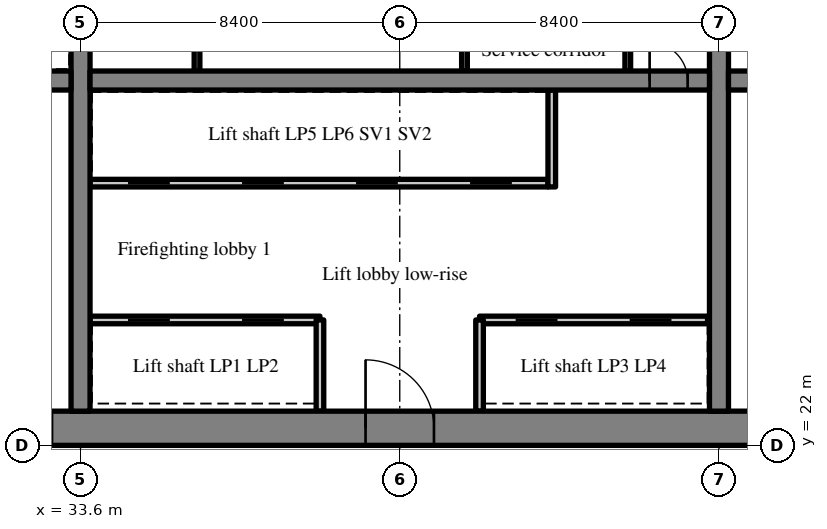
"""IFC4 building model, lengths in metres.
Left out: names, types, materials, properties, quantities, classifications, styles, units other than length and angle.
Written with IfcOpenShell. Run it as: python <this file> out.ifc"""

import sys

from ifc_helpers import new_model, si_unit, direction, frame, frame_2d, origin, place, context, subcontext, project, spatial, rectangle, extrude, source, transform, mapped, element, fill, save


model = new_model("IFC4")
c1 = context("Model", 3, precision=1e-05, world=origin(), true_north=direction((0.0, 1.0)))
c2 = subcontext(c1, "Body", "Model", "MODEL_VIEW")
j1 = project(units=[si_unit("LENGTHUNIT", "METRE"), si_unit("PLANEANGLEUNIT", "RADIAN")], contexts=[c1])
p1 = place(None, origin())
s1 = spatial("IfcSite", under=j1, at=p1, CompositionType="ELEMENT")
p2 = place(p1, origin())
s2 = spatial("IfcBuilding", under=s1, at=p2, CompositionType="ELEMENT")
p3 = place(p2, frame((0.0, 0.0, 114.2)))
s3 = spatial("IfcBuildingStorey", under=s2, at=p3, CompositionType="ELEMENT", Elevation=114.2)
m1 = source(origin(), c2, "Body", "SweptSolid", [
    extrude(rectangle(XDim=50.4, YDim=0.9, at=frame_2d((25.2, 0.0))), origin(), (0.0, 0.0, 1.0), 3.52),
])
p4 = place(p3, frame((25.2, 22.45, 0.0), z_axis=(0.0, 0.0, 1.0), x_axis=(1.0, 0.0, 0.0)))
e1 = element("IfcWall", 1, at=p4, inside=s3, PredefinedType="SHEAR", context=c2, shape_type="MappedRepresentation", body=[
    mapped(m1, transform((0.0, 0.0, 0.0), scale=1.0)),
])
m2 = source(origin(), c2, "Body", "SweptSolid", [
    extrude(rectangle(XDim=1.8, YDim=2.1, at=frame_2d((0.9, 1.05))), frame((0.0, 0.46, 0.0), z_axis=(0.0, -1.0, 0.0), x_axis=(1.0, 0.0, 0.0)), (0.0, 0.0, 1.0), 0.92),
])
p5 = place(p4, frame((15.9, 0.0, 0.0)))
e2 = element("IfcOpeningElement", 2, at=p5, cuts=e1, PredefinedType="OPENING", context=c2, shape_type="MappedRepresentation", body=[
    mapped(m2, transform((0.0, 0.0, 0.0), scale=1.0)),
])
m3 = source(origin(), c2, "Body", "SweptSolid", [
    extrude(rectangle(XDim=1.2, YDim=2.1, at=frame_2d((0.6, 1.05))), frame((0.0, 0.46, 0.0), z_axis=(0.0, -1.0, 0.0), x_axis=(1.0, 0.0, 0.0)), (0.0, 0.0, 1.0), 0.92),
])
p6 = place(p4, frame((26.975, 0.0, 0.0)))
e3 = element("IfcOpeningElement", 3, at=p6, cuts=e1, PredefinedType="OPENING", context=c2, shape_type="MappedRepresentation", body=[
    mapped(m3, transform((0.0, 0.0, 0.0), scale=1.0)),
])
m4 = source(origin(), c2, "Body", "SweptSolid", [
    extrude(rectangle(XDim=0.9, YDim=2.1, at=frame_2d((0.45, 1.05))), frame((0.0, 0.46, 0.0), z_axis=(0.0, -1.0, 0.0), x_axis=(1.0, 0.0, 0.0)), (0.0, 0.0, 1.0), 0.92),
])
p7 = place(p4, frame((33.75, 0.0, 0.0)))
e4 = element("IfcOpeningElement", 4, at=p7, cuts=e1, PredefinedType="OPENING", context=c2, shape_type="MappedRepresentation", body=[
    mapped(m4, transform((0.0, 0.0, 0.0), scale=1.0)),
])
p8 = place(p4, frame((30.75, 0.0, 0.0)))
e5 = element("IfcOpeningElement", 5, at=p8, cuts=e1, PredefinedType="OPENING", context=c2, shape_type="MappedRepresentation", body=[
    mapped(m4, transform((0.0, 0.0, 0.0), scale=1.0)),
])
p9 = place(p4, frame((39.788, 0.0, 0.0)))
e6 = element("IfcOpeningElement", 6, at=p9, cuts=e1, PredefinedType="OPENING", context=c2, shape_type="MappedRepresentation", body=[
    mapped(m4, transform((0.0, 0.0, 0.0), scale=1.0)),
])
p10 = place(p4, frame((36.762, 0.0, 0.0)))
e7 = element("IfcOpeningElement", 7, at=p10, cuts=e1, PredefinedType="OPENING", context=c2, shape_type="MappedRepresentation", body=[
    mapped(m4, transform((0.0, 0.0, 0.0), scale=1.0)),
])
p11 = place(p4, frame((6.45, 0.0, 0.0)))
e8 = element("IfcOpeningElement", 8, at=p11, cuts=e1, PredefinedType="OPENING", context=c2, shape_type="MappedRepresentation", body=[
    mapped(m3, transform((0.0, 0.0, 0.0), scale=1.0)),
])
p12 = place(p4, frame((47.775, 0.0, 0.0)))
e9 = element("IfcOpeningElement", 9, at=p12, cuts=e1, PredefinedType="OPENING", context=c2, shape_type="MappedRepresentation", body=[
    mapped(m3, transform((0.0, 0.0, 0.0), scale=1.0)),
])
m5 = source(origin(), c2, "Body", "SweptSolid", [
    extrude(rectangle(XDim=18.2, YDim=0.5, at=frame_2d((9.1, 0.0))), origin(), (0.0, 0.0, 1.0), 3.52),
])
p13 = place(p3, frame((33.6, 22.9, 0.0), z_axis=(0.0, 0.0, 1.0), x_axis=(0.0, 1.0, 0.0)))
e10 = element("IfcWall", 10, at=p13, inside=s3, PredefinedType="SHEAR", context=c2, shape_type="MappedRepresentation", body=[
    mapped(m5, transform((0.0, 0.0, 0.0), scale=1.0)),
])
m6 = source(origin(), c2, "Body", "SweptSolid", [
    extrude(rectangle(XDim=1.1, YDim=2.1, at=frame_2d((0.55, 1.05))), frame((0.0, 0.26, 0.0), z_axis=(0.0, -1.0, 0.0), x_axis=(1.0, 0.0, 0.0)), (0.0, 0.0, 1.0), 0.52),
])
p14 = place(p13, frame((12.55, 0.0, 0.0)))
e11 = element("IfcOpeningElement", 11, at=p14, cuts=e10, PredefinedType="OPENING", context=c2, shape_type="MappedRepresentation", body=[
    mapped(m6, transform((0.0, 0.0, 0.0), scale=1.0)),
])
p15 = place(p3, frame((50.4, 22.9, 0.0), z_axis=(0.0, 0.0, 1.0), x_axis=(0.0, 1.0, 0.0)))
e12 = element("IfcWall", 12, at=p15, inside=s3, PredefinedType="SHEAR", context=c2, shape_type="MappedRepresentation", body=[
    mapped(m5, transform((0.0, 0.0, 0.0), scale=1.0)),
])
p16 = place(p15, frame((12.55, 0.0, 0.0)))
e13 = element("IfcOpeningElement", 13, at=p16, cuts=e12, PredefinedType="OPENING", context=c2, shape_type="MappedRepresentation", body=[
    mapped(m6, transform((0.0, 0.0, 0.0), scale=1.0)),
])
m7 = source(origin(), c2, "Body", "SweptSolid", [
    extrude(rectangle(XDim=7.25, YDim=0.5, at=frame_2d((3.625, 0.0))), origin(), (0.0, 0.0, 1.0), 3.52),
])
p17 = place(p3, frame((26.1, 31.6, 0.0), z_axis=(0.0, 0.0, 1.0), x_axis=(1.0, 0.0, 0.0)))
e14 = element("IfcWall", 14, at=p17, inside=s3, PredefinedType="SHEAR", context=c2, shape_type="MappedRepresentation", body=[
    mapped(m7, transform((0.0, 0.0, 0.0), scale=1.0)),
])
p18 = place(p17, frame((5.6, 0.0, 0.0)))
e15 = element("IfcOpeningElement", 15, at=p18, cuts=e14, PredefinedType="OPENING", context=c2, shape_type="MappedRepresentation", body=[
    mapped(m6, transform((0.0, 0.0, 0.0), scale=1.0)),
])
m8 = source(origin(), c2, "Body", "SweptSolid", [
    extrude(rectangle(XDim=16.3, YDim=0.5, at=frame_2d((8.15, 0.0))), origin(), (0.0, 0.0, 1.0), 3.52),
])
p19 = place(p3, frame((33.85, 31.6, 0.0), z_axis=(0.0, 0.0, 1.0), x_axis=(1.0, 0.0, 0.0)))
e16 = element("IfcWall", 16, at=p19, inside=s3, PredefinedType="SHEAR", context=c2, shape_type="MappedRepresentation", body=[
    mapped(m8, transform((0.0, 0.0, 0.0), scale=1.0)),
])
m9 = source(origin(), c2, "Body", "SweptSolid", [
    extrude(rectangle(XDim=1.0, YDim=2.1, at=frame_2d((0.5, 1.05))), frame((0.0, 0.26, 0.0), z_axis=(0.0, -1.0, 0.0), x_axis=(1.0, 0.0, 0.0)), (0.0, 0.0, 1.0), 0.52),
])
p20 = place(p19, frame((14.725, 0.0, 0.0)))
e17 = element("IfcOpeningElement", 17, at=p20, cuts=e16, PredefinedType="OPENING", context=c2, shape_type="MappedRepresentation", body=[
    mapped(m9, transform((0.0, 0.0, 0.0), scale=1.0)),
])
m10 = source(origin(), c2, "Body", "SweptSolid", [
    extrude(rectangle(XDim=16.3, YDim=0.5, at=frame_2d((8.15, 0.0))), origin(), (0.0, 0.0, 1.0), 3.52),
])
p21 = place(p3, frame((50.65, 31.6, 0.0), z_axis=(0.0, 0.0, 1.0), x_axis=(1.0, 0.0, 0.0)))
e18 = element("IfcWall", 18, at=p21, inside=s3, PredefinedType="SHEAR", context=c2, shape_type="MappedRepresentation", body=[
    mapped(m10, transform((0.0, 0.0, 0.0), scale=1.0)),
])
p22 = place(p21, frame((0.575, 0.0, 0.0)))
e19 = element("IfcOpeningElement", 19, at=p22, cuts=e18, PredefinedType="OPENING", context=c2, shape_type="MappedRepresentation", body=[
    mapped(m9, transform((0.0, 0.0, 0.0), scale=1.0)),
])
m11 = source(origin(), c2, "Body", "SweptSolid", [
    extrude(rectangle(XDim=6.05, YDim=0.2, at=frame_2d((3.025, 0.0))), origin(), (0.0, 0.0, 1.0), 3.52),
])
p23 = place(p3, frame((33.85, 25.3, 0.0), z_axis=(0.0, 0.0, 1.0), x_axis=(1.0, 0.0, 0.0)))
e20 = element("IfcWall", 20, at=p23, inside=s3, PredefinedType="SOLIDWALL", context=c2, shape_type="MappedRepresentation", body=[
    mapped(m11, transform((0.0, 0.0, 0.0), scale=1.0)),
])
m12 = source(origin(), c2, "Body", "SweptSolid", [
    extrude(rectangle(XDim=1.1, YDim=2.1, at=frame_2d((0.55, 1.05))), frame((0.0, 0.11, 0.0), z_axis=(0.0, -1.0, 0.0), x_axis=(1.0, 0.0, 0.0)), (0.0, 0.0, 1.0), 0.22),
])
p24 = place(p23, frame((1.0, 0.0, 0.0)))
e21 = element("IfcOpeningElement", 21, at=p24, cuts=e20, PredefinedType="OPENING", context=c2, shape_type="MappedRepresentation", body=[
    mapped(m12, transform((0.0, 0.0, 0.0), scale=1.0)),
])
p25 = place(p23, frame((4.0, 0.0, 0.0)))
e22 = element("IfcOpeningElement", 22, at=p25, cuts=e20, PredefinedType="OPENING", context=c2, shape_type="MappedRepresentation", body=[
    mapped(m12, transform((0.0, 0.0, 0.0), scale=1.0)),
])
m13 = source(origin(), c2, "Body", "SweptSolid", [
    extrude(rectangle(XDim=6.0, YDim=0.2, at=frame_2d((3.0, 0.0))), origin(), (0.0, 0.0, 1.0), 3.52),
])
p26 = place(p3, frame((44.1, 25.3, 0.0), z_axis=(0.0, 0.0, 1.0), x_axis=(1.0, 0.0, 0.0)))
e23 = element("IfcWall", 23, at=p26, inside=s3, PredefinedType="SOLIDWALL", context=c2, shape_type="MappedRepresentation", body=[
    mapped(m13, transform((0.0, 0.0, 0.0), scale=1.0)),
])
p27 = place(p26, frame((0.95, 0.0, 0.0)))
e24 = element("IfcOpeningElement", 24, at=p27, cuts=e23, PredefinedType="OPENING", context=c2, shape_type="MappedRepresentation", body=[
    mapped(m12, transform((0.0, 0.0, 0.0), scale=1.0)),
])
p28 = place(p26, frame((3.95, 0.0, 0.0)))
e25 = element("IfcOpeningElement", 25, at=p28, cuts=e23, PredefinedType="OPENING", context=c2, shape_type="MappedRepresentation", body=[
    mapped(m12, transform((0.0, 0.0, 0.0), scale=1.0)),
])
m14 = source(origin(), c2, "Body", "SweptSolid", [
    extrude(rectangle(XDim=12.05, YDim=0.2, at=frame_2d((6.025, 0.0))), origin(), (0.0, 0.0, 1.0), 3.52),
])
p29 = place(p3, frame((33.85, 28.9, 0.0), z_axis=(0.0, 0.0, 1.0), x_axis=(1.0, 0.0, 0.0)))
e26 = element("IfcWall", 26, at=p29, inside=s3, PredefinedType="SOLIDWALL", context=c2, shape_type="MappedRepresentation", body=[
    mapped(m14, transform((0.0, 0.0, 0.0), scale=1.0)),
])
p30 = place(p29, frame((1.0, 0.0, 0.0)))
e27 = element("IfcOpeningElement", 27, at=p30, cuts=e26, PredefinedType="OPENING", context=c2, shape_type="MappedRepresentation", body=[
    mapped(m12, transform((0.0, 0.0, 0.0), scale=1.0)),
])
p31 = place(p29, frame((4.0, 0.0, 0.0)))
e28 = element("IfcOpeningElement", 28, at=p31, cuts=e26, PredefinedType="OPENING", context=c2, shape_type="MappedRepresentation", body=[
    mapped(m12, transform((0.0, 0.0, 0.0), scale=1.0)),
])
p32 = place(p29, frame((7.0, 0.0, 0.0)))
e29 = element("IfcOpeningElement", 29, at=p32, cuts=e26, PredefinedType="OPENING", context=c2, shape_type="MappedRepresentation", body=[
    mapped(m12, transform((0.0, 0.0, 0.0), scale=1.0)),
])
p33 = place(p29, frame((10.0, 0.0, 0.0)))
e30 = element("IfcOpeningElement", 30, at=p33, cuts=e26, PredefinedType="OPENING", context=c2, shape_type="MappedRepresentation", body=[
    mapped(m12, transform((0.0, 0.0, 0.0), scale=1.0)),
])
m15 = source(origin(), c2, "Body", "SweptSolid", [
    extrude(rectangle(XDim=2.4, YDim=0.2, at=frame_2d((1.2, 0.0))), origin(), (0.0, 0.0, 1.0), 3.52),
])
for number, where, z_axis, x_axis in (
    (31, (39.9, 22.9, 0.0), (0.0, 0.0, 1.0), (0.0, 1.0, 0.0)),
    (32, (44.1, 22.9, 0.0), (0.0, 0.0, 1.0), (0.0, 1.0, 0.0)),
):
    element("IfcWall", number, at=place(p3, frame(where, z_axis=z_axis, x_axis=x_axis)), inside=s3, PredefinedType="SOLIDWALL", context=c2, shape_type="MappedRepresentation", body=[
        mapped(m15, transform((0.0, 0.0, 0.0), scale=1.0)),
    ])
m16 = source(origin(), c2, "Body", "SweptSolid", [
    extrude(rectangle(XDim=2.55, YDim=0.2, at=frame_2d((1.275, 0.0))), origin(), (0.0, 0.0, 1.0), 3.52),
])
p34 = place(p3, frame((46.0, 28.8, 0.0), z_axis=(0.0, 0.0, 1.0), x_axis=(0.0, 1.0, 0.0)))
e33 = element("IfcWall", 33, at=p34, inside=s3, PredefinedType="SOLIDWALL", context=c2, shape_type="MappedRepresentation", body=[
    mapped(m16, transform((0.0, 0.0, 0.0), scale=1.0)),
])
m17 = source(origin(), c2, "Body", "SweptSolid", [
    extrude(rectangle(XDim=3.15, YDim=0.15, at=frame_2d((1.575, 0.0))), origin(), (0.0, 0.0, 1.0), 3.52),
])
for number, where, z_axis, x_axis in (
    (34, (48.0, 31.85, 0.0), (0.0, 0.0, 1.0), (0.0, 1.0, 0.0)),
    (35, (36.665, 31.85, 0.0), (0.0, 0.0, 1.0), (0.0, 1.0, 0.0)),
    (36, (43.703, 31.85, 0.0), (0.0, 0.0, 1.0), (0.0, 1.0, 0.0)),
):
    element("IfcWall", number, at=place(p3, frame(where, z_axis=z_axis, x_axis=x_axis)), inside=s3, PredefinedType="PARTITIONING", context=c2, shape_type="MappedRepresentation", body=[
        mapped(m17, transform((0.0, 0.0, 0.0), scale=1.0)),
    ])
m18 = source(origin(), c2, "Body", "SweptSolid", [
    extrude(rectangle(XDim=1.8, YDim=2.1, at=frame_2d((0.9, 1.05))), frame((0.0, 0.375, 0.0), z_axis=(0.0, -1.0, 0.0), x_axis=(1.0, 0.0, 0.0)), (0.0, 0.0, 1.0), 0.05),
])
p35 = place(p5, origin())
e37 = element("IfcDoor", 37, at=p35, inside=s3, OperationType="DOUBLE_DOOR_SINGLE_SWING", PredefinedType="DOOR", context=c2, shape_type="MappedRepresentation", body=[
    mapped(m18, transform((0.0, 0.0, 0.0), scale=1.0)),
])
fill(e2, e37)
m19 = source(origin(), c2, "Body", "SweptSolid", [
    extrude(rectangle(XDim=1.0, YDim=2.1, at=frame_2d((0.5, 1.05))), frame((0.0, 0.025, 0.0), z_axis=(0.0, -1.0, 0.0), x_axis=(1.0, 0.0, 0.0)), (0.0, 0.0, 1.0), 0.05),
])
p36 = place(p20, origin())
e38 = element("IfcDoor", 38, at=p36, inside=s3, OperationType="SINGLE_SWING_LEFT", PredefinedType="DOOR", context=c2, shape_type="MappedRepresentation", body=[
    mapped(m19, transform((0.0, 0.0, 0.0), scale=1.0)),
])
fill(e17, e38)
m20 = source(origin(), c2, "Body", "SweptSolid", [
    extrude(rectangle(XDim=1.1, YDim=2.1, at=frame_2d((0.55, 1.05))), frame((0.0, 0.025, 0.0), z_axis=(0.0, -1.0, 0.0), x_axis=(1.0, 0.0, 0.0)), (0.0, 0.0, 1.0), 0.05),
])
p37 = place(p24, origin())
e39 = element("IfcDoor", 39, at=p37, inside=s3, OperationType="SLIDING_TO_LEFT", PredefinedType="DOOR", context=c2, shape_type="MappedRepresentation", body=[
    mapped(m20, transform((0.0, 0.0, 0.0), scale=1.0)),
])
fill(e21, e39)
p38 = place(p25, origin())
e40 = element("IfcDoor", 40, at=p38, inside=s3, OperationType="SLIDING_TO_RIGHT", PredefinedType="DOOR", context=c2, shape_type="MappedRepresentation", body=[
    mapped(m20, transform((0.0, 0.0, 0.0), scale=1.0)),
])
fill(e22, e40)
p39 = place(p27, origin())
e41 = element("IfcDoor", 41, at=p39, inside=s3, OperationType="SLIDING_TO_LEFT", PredefinedType="DOOR", context=c2, shape_type="MappedRepresentation", body=[
    mapped(m20, transform((0.0, 0.0, 0.0), scale=1.0)),
])
fill(e24, e41)
p40 = place(p28, origin())
e42 = element("IfcDoor", 42, at=p40, inside=s3, OperationType="SLIDING_TO_RIGHT", PredefinedType="DOOR", context=c2, shape_type="MappedRepresentation", body=[
    mapped(m20, transform((0.0, 0.0, 0.0), scale=1.0)),
])
fill(e25, e42)
p41 = place(p30, origin())
e43 = element("IfcDoor", 43, at=p41, inside=s3, OperationType="SLIDING_TO_LEFT", PredefinedType="DOOR", context=c2, shape_type="MappedRepresentation", body=[
    mapped(m20, transform((0.0, 0.0, 0.0), scale=1.0)),
])
fill(e27, e43)
p42 = place(p31, origin())
e44 = element("IfcDoor", 44, at=p42, inside=s3, OperationType="SLIDING_TO_RIGHT", PredefinedType="DOOR", context=c2, shape_type="MappedRepresentation", body=[
    mapped(m20, transform((0.0, 0.0, 0.0), scale=1.0)),
])
fill(e28, e44)
p43 = place(p32, origin())
e45 = element("IfcDoor", 45, at=p43, inside=s3, OperationType="SLIDING_TO_LEFT", PredefinedType="DOOR", context=c2, shape_type="MappedRepresentation", body=[
    mapped(m20, transform((0.0, 0.0, 0.0), scale=1.0)),
])
fill(e29, e45)
p44 = place(p33, origin())
e46 = element("IfcDoor", 46, at=p44, inside=s3, OperationType="SLIDING_TO_RIGHT", PredefinedType="DOOR", context=c2, shape_type="MappedRepresentation", body=[
    mapped(m20, transform((0.0, 0.0, 0.0), scale=1.0)),
])
fill(e30, e46)
save(model, sys.argv[1])
